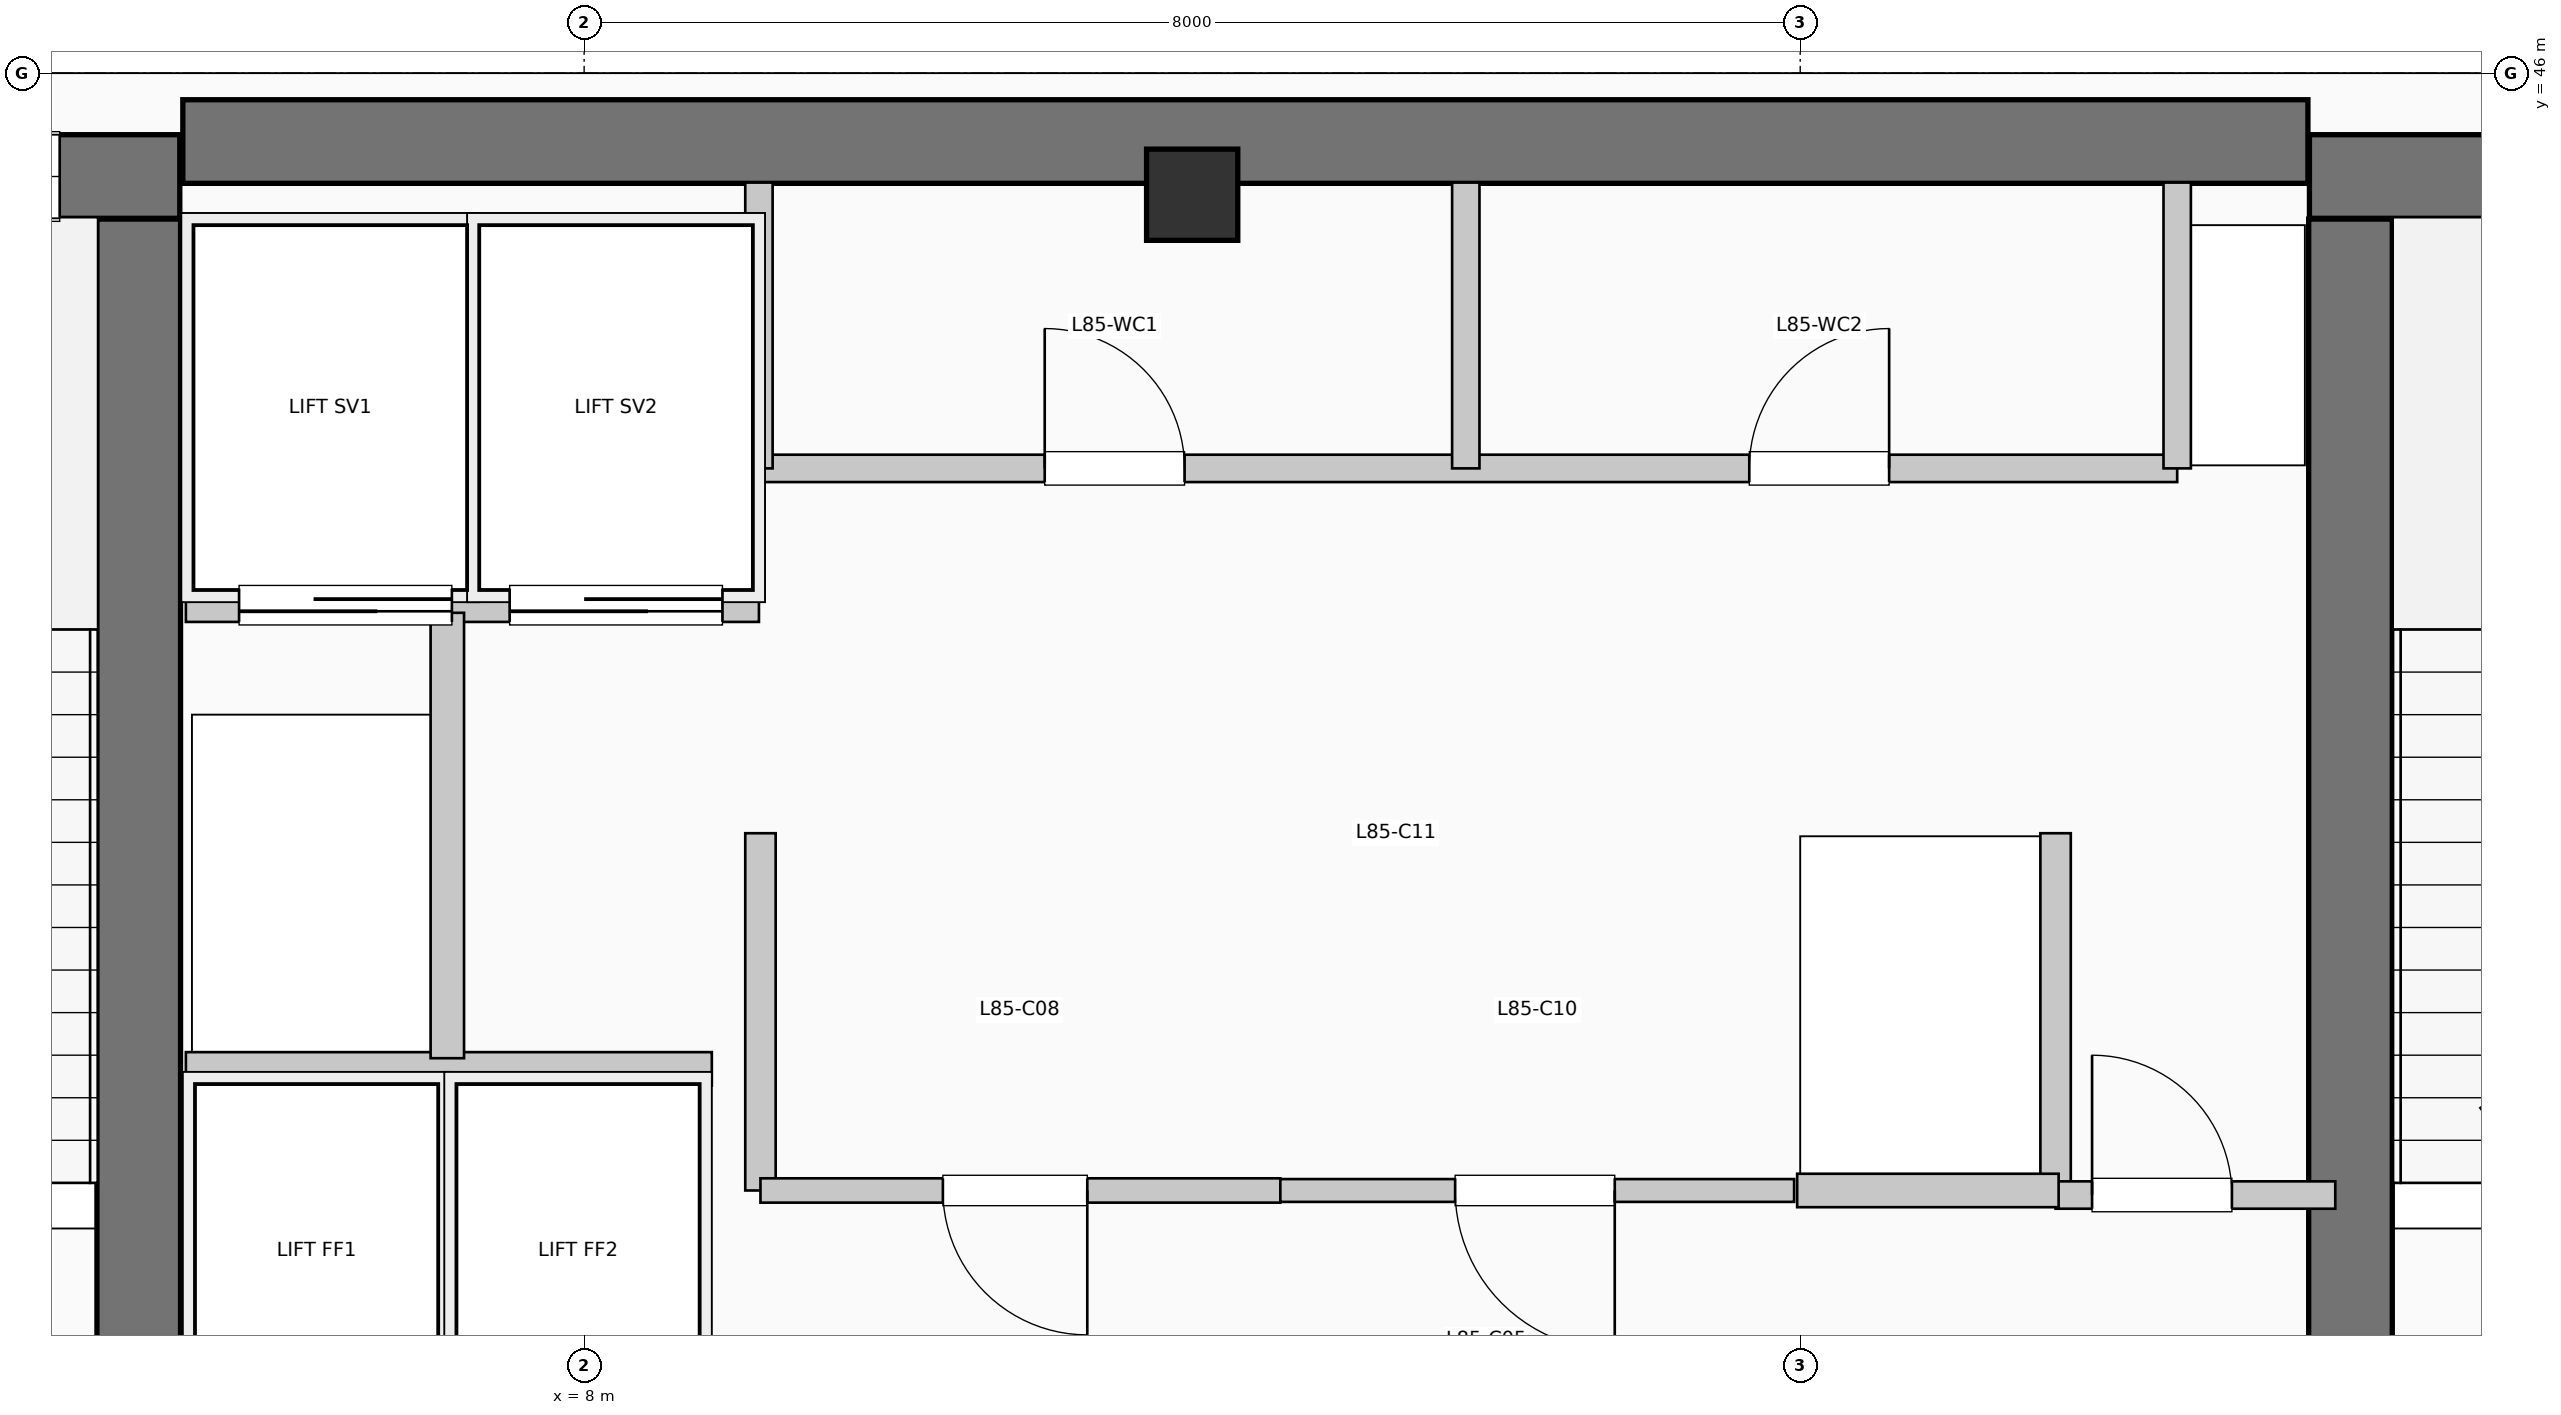
"""IFC4 building model, lengths in metres.
Left out: names, types, materials, properties, quantities, classifications, styles, units other than length and angle.
Written with IfcOpenShell. Run it as: python <this file> out.ifc"""

import sys

from ifc_helpers import new_model, si_unit, direction, frame, frame_2d, origin, origin_2d, place, context, subcontext, project, spatial, rectangle, extrude, element, fill, save


model = new_model("IFC4")
c1 = context("Model", 3, precision=1e-05, world=origin(), true_north=direction((0.0, 1.0)))
c2 = subcontext(c1, "Body", "Model", "MODEL_VIEW")
j1 = project(units=[si_unit("LENGTHUNIT", "METRE"), si_unit("PLANEANGLEUNIT", "RADIAN")], contexts=[c1])
p1 = place(None, origin())
s1 = spatial("IfcSite", under=j1, at=p1, CompositionType="ELEMENT")
p2 = place(p1, origin())
s2 = spatial("IfcBuilding", under=s1, at=p2, CompositionType="ELEMENT")
p3 = place(p2, frame((0.0, 0.0, 347.49)))
s3 = spatial("IfcBuildingStorey", under=s2, at=p3, CompositionType="ELEMENT", Elevation=347.49)
p4 = place(p3, frame((5.36, 45.55, 0.0), z_axis=(0.0, 0.0, 1.0), x_axis=(1.0, 0.0, 0.0)))
e1 = element("IfcWall", 1, at=p4, inside=s3, PredefinedType="SHEAR", context=c2, shape_type="SweptSolid", body=[
    extrude(rectangle(XDim=13.98, YDim=0.55, at=frame_2d((6.99, 0.0))), origin(), (0.0, 0.0, 1.0), 4.62),
])
p5 = place(p3, frame((5.07, 37.15, 0.0), z_axis=(0.0, 0.0, 1.0), x_axis=(0.0, 1.0, 0.0)))
e2 = element("IfcWall", 2, at=p5, inside=s3, PredefinedType="SHEAR", context=c2, shape_type="SweptSolid", body=[
    extrude(rectangle(XDim=7.89, YDim=0.55, at=frame_2d((3.945, 0.0))), origin(), (0.0, 0.0, 1.0), 4.62),
])
p6 = place(p3, frame((1.1, 45.32, 0.0), z_axis=(0.0, 0.0, 1.0), x_axis=(1.0, 0.0, 0.0)))
e3 = element("IfcWall", 3, at=p6, inside=s3, PredefinedType="SHEAR", context=c2, shape_type="SweptSolid", body=[
    extrude(rectangle(XDim=4.24, YDim=0.55, at=frame_2d((2.12, 0.0))), origin(), (0.0, 0.0, 1.0), 4.62),
])
p7 = place(p6, frame((2.05, 0.0, 1.05)))
e4 = element("IfcOpeningElement", 4, at=p7, cuts=e3, PredefinedType="OPENING", context=c2, shape_type="SweptSolid", body=[
    extrude(rectangle(XDim=1.4, YDim=1.8, at=frame_2d((0.7, 0.9))), frame((0.0, 0.285, 0.0), z_axis=(0.0, -1.0, 0.0), x_axis=(1.0, 0.0, 0.0)), (0.0, 0.0, 1.0), 0.57),
])
p8 = place(p3, frame((19.62, 37.15, 0.0), z_axis=(0.0, 0.0, 1.0), x_axis=(0.0, 1.0, 0.0)))
e5 = element("IfcWall", 5, at=p8, inside=s3, PredefinedType="SHEAR", context=c2, shape_type="SweptSolid", body=[
    extrude(rectangle(XDim=7.89, YDim=0.55, at=frame_2d((3.945, 0.0))), origin(), (0.0, 0.0, 1.0), 4.62),
])
p9 = place(p3, frame((19.35, 45.32, 0.0), z_axis=(0.0, 0.0, 1.0), x_axis=(1.0, 0.0, 0.0)))
e6 = element("IfcWall", 6, at=p9, inside=s3, PredefinedType="SHEAR", context=c2, shape_type="SweptSolid", body=[
    extrude(rectangle(XDim=3.69, YDim=0.55, at=frame_2d((1.845, 0.0))), origin(), (0.0, 0.0, 1.0), 4.62),
])
p10 = place(p9, frame((1.15, 0.0, 1.05)))
e7 = element("IfcOpeningElement", 7, at=p10, cuts=e6, PredefinedType="OPENING", context=c2, shape_type="SweptSolid", body=[
    extrude(rectangle(XDim=1.4, YDim=1.8, at=frame_2d((0.7, 0.9))), frame((0.0, 0.285, 0.0), z_axis=(0.0, -1.0, 0.0), x_axis=(1.0, 0.0, 0.0)), (0.0, 0.0, 1.0), 0.57),
])
p11 = place(p3, frame((12.0, 45.2, 0.0), z_axis=(0.0, 0.0, 1.0), x_axis=(1.0, 0.0, 0.0)))
e8 = element("IfcColumn", 8, at=p11, inside=s3, PredefinedType="COLUMN", context=c2, shape_type="SweptSolid", body=[
    extrude(rectangle(XDim=0.6, YDim=0.6, at=origin_2d()), origin(), (0.0, 0.0, 1.0), 4.62),
])
p12 = place(p3, frame((5.38, 39.45, 0.0), z_axis=(0.0, 0.0, 1.0), x_axis=(1.0, 0.0, 0.0)))
e9 = element("IfcWall", 9, at=p12, inside=s3, PredefinedType="PARTITIONING", context=c2, shape_type="SweptSolid", body=[
    extrude(rectangle(XDim=3.46, YDim=0.22, at=frame_2d((1.73, 0.0))), origin(), (0.0, 0.0, 1.0), 4.37),
])
p13 = place(p3, frame((5.38, 42.5, 0.0), z_axis=(0.0, 0.0, 1.0), x_axis=(1.0, 0.0, 0.0)))
e10 = element("IfcWall", 10, at=p13, inside=s3, PredefinedType="PARTITIONING", context=c2, shape_type="SweptSolid", body=[
    extrude(rectangle(XDim=3.77, YDim=0.22, at=frame_2d((1.885, 0.0))), origin(), (0.0, 0.0, 1.0), 4.37),
])
p14 = place(p13, frame((1.75, 0.0, 0.0), z_axis=(0.0, 0.0, 1.0), x_axis=(-1.0, 0.0, 0.0)))
e11 = element("IfcOpeningElement", 11, at=p14, cuts=e10, PredefinedType="OPENING", context=c2, shape_type="SweptSolid", body=[
    extrude(rectangle(XDim=1.4, YDim=2.2, at=frame_2d((0.7, 1.1))), frame((0.0, 0.12, 0.0), z_axis=(0.0, -1.0, 0.0), x_axis=(1.0, 0.0, 0.0)), (0.0, 0.0, 1.0), 0.24),
])
p15 = place(p13, frame((3.53, 0.0, 0.0), z_axis=(0.0, 0.0, 1.0), x_axis=(-1.0, 0.0, 0.0)))
e12 = element("IfcOpeningElement", 12, at=p15, cuts=e10, PredefinedType="OPENING", context=c2, shape_type="SweptSolid", body=[
    extrude(rectangle(XDim=1.4, YDim=2.2, at=frame_2d((0.7, 1.1))), frame((0.0, 0.12, 0.0), z_axis=(0.0, -1.0, 0.0), x_axis=(1.0, 0.0, 0.0)), (0.0, 0.0, 1.0), 0.24),
])
p16 = place(p3, frame((7.1, 39.52, 0.0), z_axis=(0.0, 0.0, 1.0), x_axis=(0.0, 1.0, 0.0)))
e13 = element("IfcWall", 13, at=p16, inside=s3, PredefinedType="PARTITIONING", context=c2, shape_type="SweptSolid", body=[
    extrude(rectangle(XDim=2.93, YDim=0.22, at=frame_2d((1.465, 0.0))), origin(), (0.0, 0.0, 1.0), 4.37),
])
for number, where, z_axis, x_axis in (
    (14, (9.16, 38.65, 0.0), (0.0, 0.0, 1.0), (0.0, 1.0, 0.0)),
    (15, (17.68, 38.65, 0.0), (0.0, 0.0, 1.0), (0.0, 1.0, 0.0)),
):
    element("IfcWall", number, at=place(p3, frame(where, z_axis=z_axis, x_axis=x_axis)), inside=s3, PredefinedType="PARTITIONING", context=c2, shape_type="SweptSolid", body=[
        extrude(rectangle(XDim=2.35, YDim=0.2, at=frame_2d((1.175, 0.0))), origin(), (0.0, 0.0, 1.0), 4.37),
    ])
p17 = place(p3, frame((17.68, 38.62, 0.0), z_axis=(0.0, 0.0, 1.0), x_axis=(1.0, 0.0, 0.0)))
e16 = element("IfcWall", 16, at=p17, inside=s3, PredefinedType="PARTITIONING", context=c2, shape_type="SweptSolid", body=[
    extrude(rectangle(XDim=1.84, YDim=0.18, at=frame_2d((0.92, 0.0))), origin(), (0.0, 0.0, 1.0), 4.37),
])
p18 = place(p17, frame((0.24, 0.0, 0.0)))
e17 = element("IfcOpeningElement", 17, at=p18, cuts=e16, PredefinedType="OPENING", context=c2, shape_type="SweptSolid", body=[
    extrude(rectangle(XDim=0.92, YDim=2.1, at=frame_2d((0.46, 1.05))), frame((0.0, 0.1, 0.0), z_axis=(0.0, -1.0, 0.0), x_axis=(1.0, 0.0, 0.0)), (0.0, 0.0, 1.0), 0.2),
])
p19 = place(p3, frame((9.16, 38.65, 0.0), z_axis=(0.0, 0.0, 1.0), x_axis=(1.0, 0.0, 0.0)))
e18 = element("IfcWall", 18, at=p19, inside=s3, PredefinedType="PARTITIONING", context=c2, shape_type="SweptSolid", body=[
    extrude(rectangle(XDim=3.42, YDim=0.16, at=frame_2d((1.71, 0.0))), origin(), (0.0, 0.0, 1.0), 4.37),
])
p20 = place(p19, frame((2.15, 0.0, 0.0), z_axis=(0.0, 0.0, 1.0), x_axis=(-1.0, 0.0, 0.0)))
e19 = element("IfcOpeningElement", 19, at=p20, cuts=e18, PredefinedType="OPENING", context=c2, shape_type="SweptSolid", body=[
    extrude(rectangle(XDim=0.95, YDim=2.15, at=frame_2d((0.475, 1.075))), frame((0.0, 0.09, 0.0), z_axis=(0.0, -1.0, 0.0), x_axis=(1.0, 0.0, 0.0)), (0.0, 0.0, 1.0), 0.18),
])
p21 = place(p3, frame((12.58, 38.65, 0.0), z_axis=(0.0, 0.0, 1.0), x_axis=(1.0, 0.0, 0.0)))
e20 = element("IfcWall", 20, at=p21, inside=s3, PredefinedType="PARTITIONING", context=c2, shape_type="SweptSolid", body=[
    extrude(rectangle(XDim=3.38, YDim=0.15, at=frame_2d((1.69, 0.0))), origin(), (0.0, 0.0, 1.0), 4.37),
])
p22 = place(p21, frame((2.2, 0.0, 0.0), z_axis=(0.0, 0.0, 1.0), x_axis=(-1.0, 0.0, 0.0)))
e21 = element("IfcOpeningElement", 21, at=p22, cuts=e20, PredefinedType="OPENING", context=c2, shape_type="SweptSolid", body=[
    extrude(rectangle(XDim=1.05, YDim=2.15, at=frame_2d((0.525, 1.075))), frame((0.0, 0.085, 0.0), z_axis=(0.0, -1.0, 0.0), x_axis=(1.0, 0.0, 0.0)), (0.0, 0.0, 1.0), 0.17),
])
p23 = place(p3, frame((15.98, 38.65, 0.0), z_axis=(0.0, 0.0, 1.0), x_axis=(1.0, 0.0, 0.0)))
e22 = element("IfcWall", 22, at=p23, inside=s3, PredefinedType="PARTITIONING", context=c2, shape_type="SweptSolid", body=[
    extrude(rectangle(XDim=1.72, YDim=0.22, at=frame_2d((0.86, 0.0))), origin(), (0.0, 0.0, 1.0), 4.37),
])
p24 = place(p3, frame((9.15, 43.4, 0.0), z_axis=(0.0, 0.0, 1.0), x_axis=(1.0, 0.0, 0.0)))
e23 = element("IfcWall", 23, at=p24, inside=s3, PredefinedType="PLUMBINGWALL", context=c2, shape_type="SweptSolid", body=[
    extrude(rectangle(XDim=9.33, YDim=0.18, at=frame_2d((4.665, 0.0))), origin(), (0.0, 0.0, 1.0), 4.37),
])
p25 = place(p24, frame((1.88, 0.0, 0.0)))
e24 = element("IfcOpeningElement", 24, at=p25, cuts=e23, PredefinedType="OPENING", context=c2, shape_type="SweptSolid", body=[
    extrude(rectangle(XDim=0.92, YDim=2.1, at=frame_2d((0.46, 1.05))), frame((0.0, 0.1, 0.0), z_axis=(0.0, -1.0, 0.0), x_axis=(1.0, 0.0, 0.0)), (0.0, 0.0, 1.0), 0.2),
])
p26 = place(p24, frame((6.515, 0.0, 0.0)))
e25 = element("IfcOpeningElement", 25, at=p26, cuts=e23, PredefinedType="OPENING", context=c2, shape_type="SweptSolid", body=[
    extrude(rectangle(XDim=0.92, YDim=2.1, at=frame_2d((0.46, 1.05))), frame((0.0, 0.1, 0.0), z_axis=(0.0, -1.0, 0.0), x_axis=(1.0, 0.0, 0.0)), (0.0, 0.0, 1.0), 0.2),
])
for number, where, z_axis, x_axis in (
    (26, (9.15, 43.4, 0.0), (0.0, 0.0, 1.0), (0.0, 1.0, 0.0)),
    (27, (18.48, 43.4, 0.0), (0.0, 0.0, 1.0), (0.0, 1.0, 0.0)),
    (28, (13.8, 43.4, 0.0), (0.0, 0.0, 1.0), (0.0, 1.0, 0.0)),
):
    element("IfcWall", number, at=place(p3, frame(where, z_axis=z_axis, x_axis=x_axis)), inside=s3, PredefinedType="PLUMBINGWALL", context=c2, shape_type="SweptSolid", body=[
        extrude(rectangle(XDim=1.88, YDim=0.18, at=frame_2d((0.94, 0.0))), origin(), (0.0, 0.0, 1.0), 4.37),
    ])
p27 = place(p7, origin())
e29 = element("IfcWindow", 29, at=p27, inside=s3, PartitioningType="SINGLE_PANEL", PredefinedType="WINDOW", context=c2, shape_type="SweptSolid", body=[
    extrude(rectangle(XDim=1.4, YDim=1.8, at=frame_2d((0.7, 0.9))), frame((0.0, 0.03, 0.0), z_axis=(0.0, -1.0, 0.0), x_axis=(1.0, 0.0, 0.0)), (0.0, 0.0, 1.0), 0.06),
])
fill(e4, e29)
p28 = place(p14, origin())
e30 = element("IfcDoor", 30, at=p28, inside=s3, OperationType="SLIDING_TO_LEFT", PredefinedType="DOOR", context=c2, shape_type="SweptSolid", body=[
    extrude(rectangle(XDim=1.4, YDim=2.2, at=frame_2d((0.7, 1.1))), frame((0.0, 0.025, 0.0), z_axis=(0.0, -1.0, 0.0), x_axis=(1.0, 0.0, 0.0)), (0.0, 0.0, 1.0), 0.05),
])
fill(e11, e30)
p29 = place(p15, origin())
e31 = element("IfcDoor", 31, at=p29, inside=s3, OperationType="SLIDING_TO_LEFT", PredefinedType="DOOR", context=c2, shape_type="SweptSolid", body=[
    extrude(rectangle(XDim=1.4, YDim=2.2, at=frame_2d((0.7, 1.1))), frame((0.0, 0.025, 0.0), z_axis=(0.0, -1.0, 0.0), x_axis=(1.0, 0.0, 0.0)), (0.0, 0.0, 1.0), 0.05),
])
fill(e12, e31)
p30 = place(p18, origin())
e32 = element("IfcDoor", 32, at=p30, inside=s3, OperationType="SINGLE_SWING_LEFT", PredefinedType="DOOR", context=c2, shape_type="SweptSolid", body=[
    extrude(rectangle(XDim=0.92, YDim=2.1, at=frame_2d((0.46, 1.05))), frame((0.0, 0.025, 0.0), z_axis=(0.0, -1.0, 0.0), x_axis=(1.0, 0.0, 0.0)), (0.0, 0.0, 1.0), 0.05),
])
fill(e17, e32)
p31 = place(p20, origin())
e33 = element("IfcDoor", 33, at=p31, inside=s3, OperationType="SINGLE_SWING_RIGHT", PredefinedType="DOOR", context=c2, shape_type="SweptSolid", body=[
    extrude(rectangle(XDim=0.95, YDim=2.15, at=frame_2d((0.475, 1.075))), frame((0.0, 0.025, 0.0), z_axis=(0.0, -1.0, 0.0), x_axis=(1.0, 0.0, 0.0)), (0.0, 0.0, 1.0), 0.05),
])
fill(e19, e33)
p32 = place(p22, origin())
e34 = element("IfcDoor", 34, at=p32, inside=s3, OperationType="SINGLE_SWING_RIGHT", PredefinedType="DOOR", context=c2, shape_type="SweptSolid", body=[
    extrude(rectangle(XDim=1.05, YDim=2.15, at=frame_2d((0.525, 1.075))), frame((0.0, 0.025, 0.0), z_axis=(0.0, -1.0, 0.0), x_axis=(1.0, 0.0, 0.0)), (0.0, 0.0, 1.0), 0.05),
])
fill(e21, e34)
p33 = place(p25, origin())
e35 = element("IfcDoor", 35, at=p33, inside=s3, OperationType="SINGLE_SWING_LEFT", PredefinedType="DOOR", context=c2, shape_type="SweptSolid", body=[
    extrude(rectangle(XDim=0.92, YDim=2.1, at=frame_2d((0.46, 1.05))), frame((0.0, 0.025, 0.0), z_axis=(0.0, -1.0, 0.0), x_axis=(1.0, 0.0, 0.0)), (0.0, 0.0, 1.0), 0.05),
])
fill(e24, e35)
p34 = place(p26, origin())
e36 = element("IfcDoor", 36, at=p34, inside=s3, OperationType="SINGLE_SWING_RIGHT", PredefinedType="DOOR", context=c2, shape_type="SweptSolid", body=[
    extrude(rectangle(XDim=0.92, YDim=2.1, at=frame_2d((0.46, 1.05))), frame((0.0, 0.025, 0.0), z_axis=(0.0, -1.0, 0.0), x_axis=(1.0, 0.0, 0.0)), (0.0, 0.0, 1.0), 0.05),
])
fill(e25, e36)
save(model, sys.argv[1])
